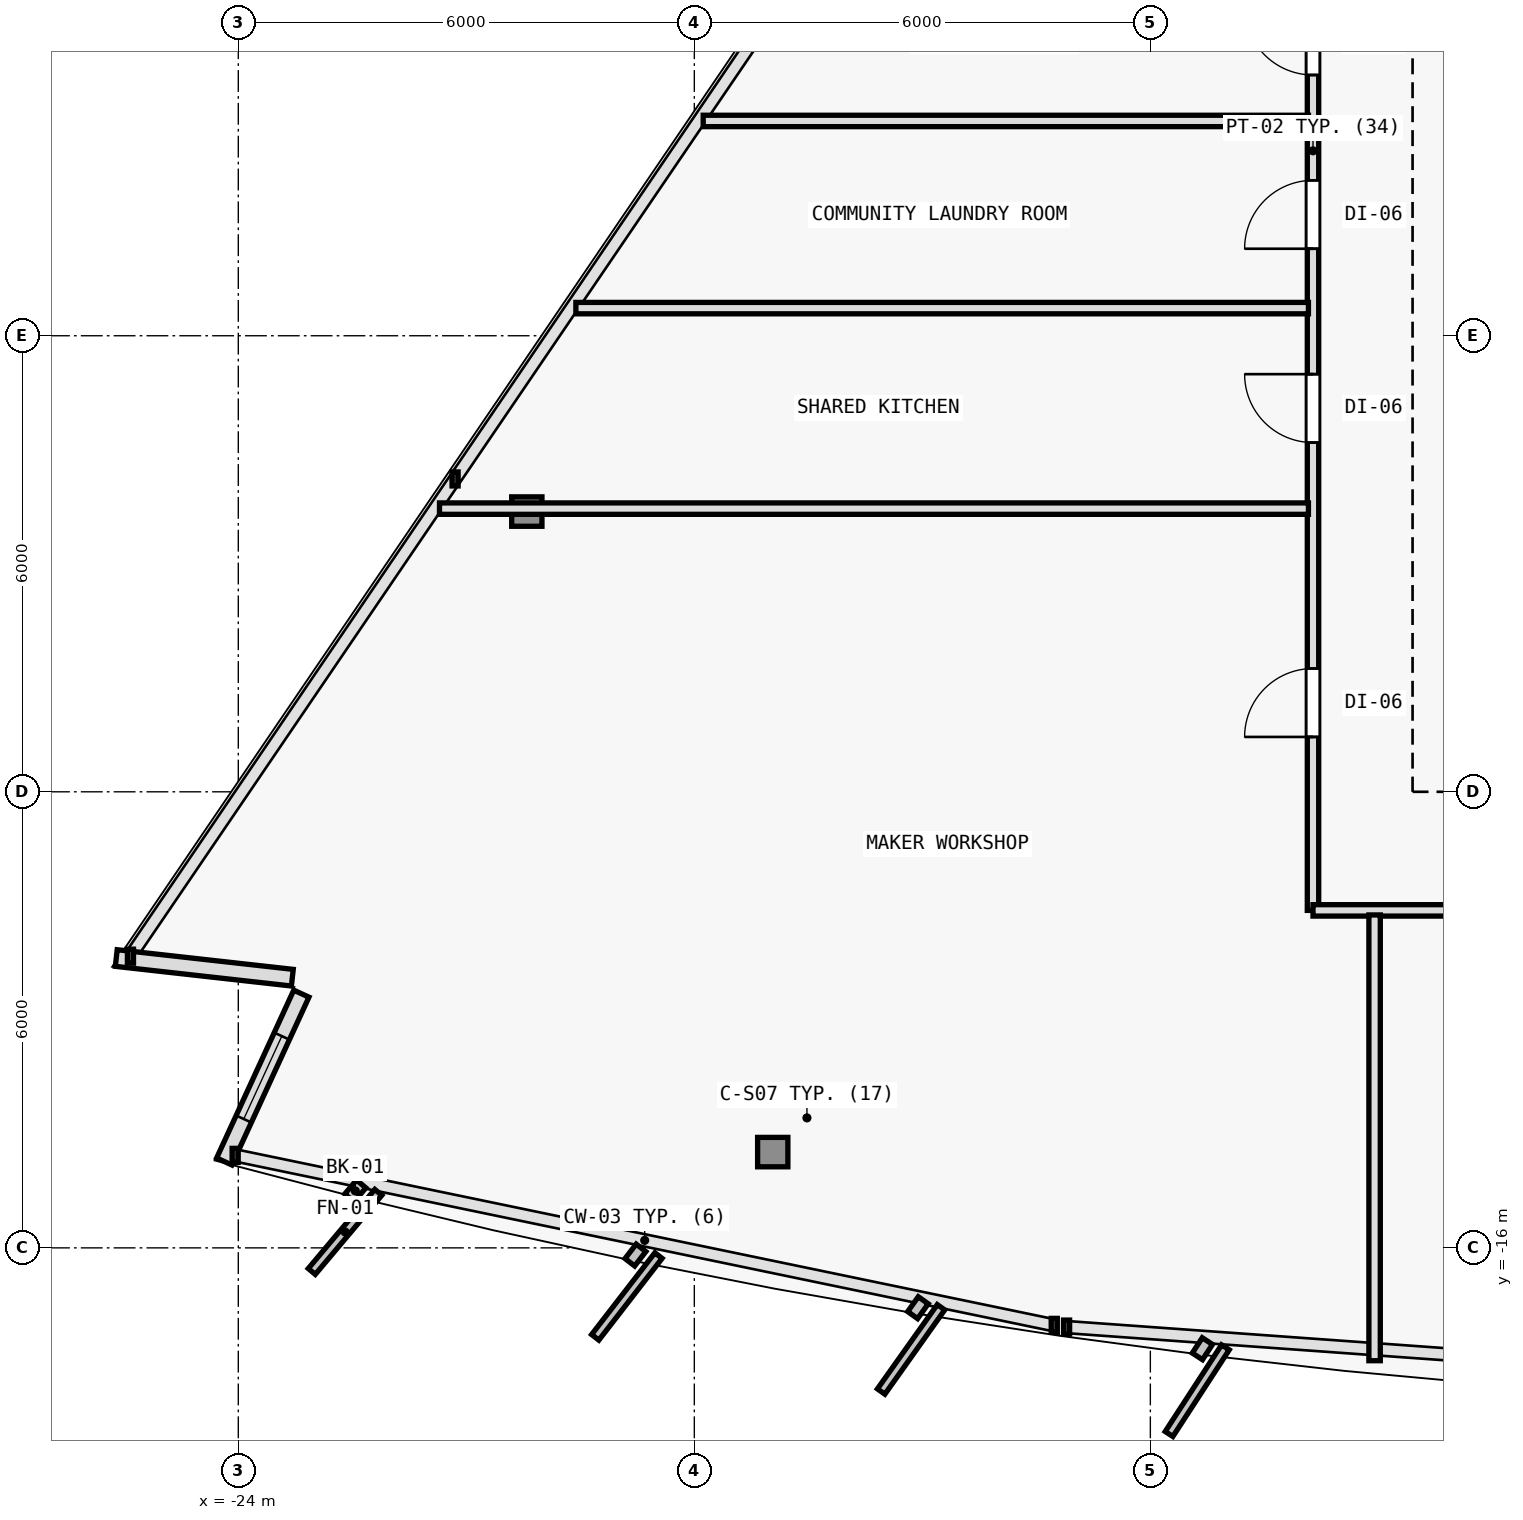
"""IFC4 building model, lengths in metres.
Left out: names, types, materials, properties, quantities, classifications, styles, units other than length and angle.
Written with IfcOpenShell. Run it as: python <this file> out.ifc"""

import sys

from ifc_helpers import new_model, si_unit, direction, frame, frame_2d, origin, origin_2d, place, context, subcontext, project, spatial, rectangle, i_section, extrude, element, fill, save


model = new_model("IFC4")
c1 = context("Model", 3, precision=1e-05, world=origin(), true_north=direction((0.0, 1.0)))
c2 = subcontext(c1, "Body", "Model", "MODEL_VIEW")
j1 = project(units=[si_unit("LENGTHUNIT", "METRE"), si_unit("PLANEANGLEUNIT", "RADIAN")], contexts=[c1])
p1 = place(None, origin())
s1 = spatial("IfcSite", under=j1, at=p1, CompositionType="ELEMENT")
p2 = place(p1, origin())
s2 = spatial("IfcBuilding", under=s1, at=p2, CompositionType="ELEMENT")
p3 = place(p2, frame((0.0, 0.0, 198.3)))
s3 = spatial("IfcBuildingStorey", under=s2, at=p3, CompositionType="ELEMENT", Elevation=198.3)
p4 = place(p3, frame((-16.968, -14.74, 0.005), z_axis=(0.020594893987, 0.033509183946, 0.999226193078), x_axis=(-0.851954850327, 0.523615252838, 0.0)))
e1 = element("IfcColumn", 1, at=p4, inside=s3, PredefinedType="COLUMN", context=c2, shape_type="SweptSolid", body=[
    extrude(i_section(OverallWidth=0.398, OverallDepth=0.387, WebThickness=0.013, FlangeThickness=0.022, FilletRadius=0.015, at=origin_2d()), origin(), (0.0, 0.0, 1.0), 3.592),
])
p5 = place(p3, frame((-20.204, -6.313, 0.005), z_axis=(0.025222449659, 0.021619242565, 0.999448065876), x_axis=(-0.650791373456, 0.759256602365, 0.0)))
e2 = element("IfcColumn", 2, at=p5, inside=s3, PredefinedType="COLUMN", context=c2, shape_type="SweptSolid", body=[
    extrude(i_section(OverallWidth=0.398, OverallDepth=0.387, WebThickness=0.013, FlangeThickness=0.022, FilletRadius=0.015, at=origin_2d()), origin(), (0.0, 0.0, 1.0), 3.591),
])
p6 = place(p3, frame((-23.289, -12.446, 0.0), z_axis=(0.0, 0.0, 1.0), x_axis=(-0.993829972675, 0.110914315635, 0.0)))
e3 = element("IfcWall", 3, at=p6, inside=s3, PredefinedType="SOLIDWALL", context=c2, shape_type="SweptSolid", body=[
    extrude(rectangle(XDim=2.331, YDim=0.22, at=frame_2d((1.166, 0.0))), origin(), (0.0, 0.0, 1.0), 3.35),
])
p7 = place(p3, frame((-24.185, -14.863, 0.0), z_axis=(0.0, 0.0, 1.0), x_axis=(0.417509141111, 0.90867272276, 0.0)))
e4 = element("IfcWall", 4, at=p7, inside=s3, PredefinedType="SOLIDWALL", context=c2, shape_type="SweptSolid", body=[
    extrude(rectangle(XDim=2.43, YDim=0.22, at=frame_2d((1.215, 0.0))), origin(), (0.0, 0.0, 1.0), 3.35),
])
p8 = place(p7, frame((0.615, 0.0, 0.62)))
e5 = element("IfcOpeningElement", 5, at=p8, cuts=e4, PredefinedType="OPENING", context=c2, shape_type="SweptSolid", body=[
    extrude(rectangle(XDim=1.2, YDim=1.8, at=frame_2d((0.6, 0.9))), frame((0.0, 0.12, 0.0), z_axis=(0.0, -1.0, 0.0), x_axis=(1.0, 0.0, 0.0)), (0.0, 0.0, 1.0), 0.24),
])
p9 = place(p3, frame((-9.86, -11.56, 0.0), z_axis=(0.0, 0.0, 1.0), x_axis=(0.0, 1.0, 0.0)))
e6 = element("IfcWall", 6, at=p9, inside=s3, PredefinedType="PARTITIONING", context=c2, shape_type="SweptSolid", body=[
    extrude(rectangle(XDim=19.986, YDim=0.15, at=frame_2d((9.993, 0.0))), origin(), (0.0, 0.0, 1.0), 2.725),
])
p10 = place(p9, frame((10.99, 0.0, 0.0)))
e7 = element("IfcOpeningElement", 7, at=p10, cuts=e6, PredefinedType="OPENING", context=c2, shape_type="SweptSolid", body=[
    extrude(rectangle(XDim=0.9, YDim=2.1, at=frame_2d((0.45, 1.05))), frame((0.0, 0.085, 0.0), z_axis=(0.0, -1.0, 0.0), x_axis=(1.0, 0.0, 0.0)), (0.0, 0.0, 1.0), 0.17),
])
p11 = place(p9, frame((8.705, 0.0, 0.0)))
e8 = element("IfcOpeningElement", 8, at=p11, cuts=e6, PredefinedType="OPENING", context=c2, shape_type="SweptSolid", body=[
    extrude(rectangle(XDim=0.9, YDim=2.1, at=frame_2d((0.45, 1.05))), frame((0.0, 0.085, 0.0), z_axis=(0.0, -1.0, 0.0), x_axis=(1.0, 0.0, 0.0)), (0.0, 0.0, 1.0), 0.17),
])
p12 = place(p9, frame((6.155, 0.0, 0.0)))
e9 = element("IfcOpeningElement", 9, at=p12, cuts=e6, PredefinedType="OPENING", context=c2, shape_type="SweptSolid", body=[
    extrude(rectangle(XDim=0.9, YDim=2.1, at=frame_2d((0.45, 1.05))), frame((0.0, 0.085, 0.0), z_axis=(0.0, -1.0, 0.0), x_axis=(1.0, 0.0, 0.0)), (0.0, 0.0, 1.0), 0.17),
])
p13 = place(p9, frame((2.282, 0.0, 0.0)))
e10 = element("IfcOpeningElement", 10, at=p13, cuts=e6, PredefinedType="OPENING", context=c2, shape_type="SweptSolid", body=[
    extrude(rectangle(XDim=0.9, YDim=2.1, at=frame_2d((0.45, 1.05))), frame((0.0, 0.085, 0.0), z_axis=(0.0, -1.0, 0.0), x_axis=(1.0, 0.0, 0.0)), (0.0, 0.0, 1.0), 0.17),
])
p14 = place(p9, frame((17.109, 0.0, 0.0)))
e11 = element("IfcOpeningElement", 11, at=p14, cuts=e6, PredefinedType="OPENING", context=c2, shape_type="SweptSolid", body=[
    extrude(rectangle(XDim=0.9, YDim=2.1, at=frame_2d((0.45, 1.05))), frame((0.0, 0.085, 0.0), z_axis=(0.0, -1.0, 0.0), x_axis=(1.0, 0.0, 0.0)), (0.0, 0.0, 1.0), 0.17),
])
p15 = place(p9, frame((13.453, 0.0, 0.0)))
e12 = element("IfcOpeningElement", 12, at=p15, cuts=e6, PredefinedType="OPENING", context=c2, shape_type="SweptSolid", body=[
    extrude(rectangle(XDim=0.9, YDim=2.1, at=frame_2d((0.45, 1.05))), frame((0.0, 0.085, 0.0), z_axis=(0.0, -1.0, 0.0), x_axis=(1.0, 0.0, 0.0)), (0.0, 0.0, 1.0), 0.17),
])
p16 = place(p3, frame((13.18, -11.56, 0.0), z_axis=(0.0, 0.0, 1.0), x_axis=(-1.0, 0.0, 0.0)))
e13 = element("IfcWall", 13, at=p16, inside=s3, PredefinedType="PARTITIONING", context=c2, shape_type="SweptSolid", body=[
    extrude(rectangle(XDim=23.04, YDim=0.15, at=frame_2d((11.52, 0.0))), origin(), (0.0, 0.0, 1.0), 2.725),
])
p17 = place(p16, frame((14.417, 0.0, 0.0)))
e14 = element("IfcOpeningElement", 14, at=p17, cuts=e13, PredefinedType="OPENING", context=c2, shape_type="SweptSolid", body=[
    extrude(rectangle(XDim=0.9, YDim=2.1, at=frame_2d((0.45, 1.05))), frame((0.0, 0.085, 0.0), z_axis=(0.0, -1.0, 0.0), x_axis=(1.0, 0.0, 0.0)), (0.0, 0.0, 1.0), 0.17),
])
p18 = place(p16, frame((5.922, 0.0, 0.0)))
e15 = element("IfcOpeningElement", 15, at=p18, cuts=e13, PredefinedType="OPENING", context=c2, shape_type="SweptSolid", body=[
    extrude(rectangle(XDim=0.9, YDim=2.1, at=frame_2d((0.45, 1.05))), frame((0.0, 0.085, 0.0), z_axis=(0.0, -1.0, 0.0), x_axis=(1.0, 0.0, 0.0)), (0.0, 0.0, 1.0), 0.17),
])
p19 = place(p16, frame((3.459, 0.0, 0.0)))
e16 = element("IfcOpeningElement", 16, at=p19, cuts=e13, PredefinedType="OPENING", context=c2, shape_type="SweptSolid", body=[
    extrude(rectangle(XDim=0.9, YDim=2.1, at=frame_2d((0.45, 1.05))), frame((0.0, 0.085, 0.0), z_axis=(0.0, -1.0, 0.0), x_axis=(1.0, 0.0, 0.0)), (0.0, 0.0, 1.0), 0.17),
])
p20 = place(p16, frame((0.929, 0.0, 0.0)))
e17 = element("IfcOpeningElement", 17, at=p20, cuts=e13, PredefinedType="OPENING", context=c2, shape_type="SweptSolid", body=[
    extrude(rectangle(XDim=0.9, YDim=2.1, at=frame_2d((0.45, 1.05))), frame((0.0, 0.085, 0.0), z_axis=(0.0, -1.0, 0.0), x_axis=(1.0, 0.0, 0.0)), (0.0, 0.0, 1.0), 0.17),
])
p21 = place(p3, frame((-9.92, -6.274, 0.0), z_axis=(0.0, 0.0, 1.0), x_axis=(-1.0, 0.0, 0.0)))
e18 = element("IfcWall", 18, at=p21, inside=s3, PredefinedType="PARTITIONING", context=c2, shape_type="SweptSolid", body=[
    extrude(rectangle(XDim=11.433, YDim=0.15, at=frame_2d((5.716, 0.0))), origin(), (0.0, 0.0, 1.0), 2.725),
])
p22 = place(p3, frame((-9.92, -1.174, 0.0), z_axis=(0.0, 0.0, 1.0), x_axis=(-1.0, 0.0, 0.0)))
e19 = element("IfcWall", 19, at=p22, inside=s3, PredefinedType="PARTITIONING", context=c2, shape_type="SweptSolid", body=[
    extrude(rectangle(XDim=7.963, YDim=0.15, at=frame_2d((3.982, 0.0))), origin(), (0.0, 0.0, 1.0), 2.725),
])
p23 = place(p3, frame((-9.92, -3.636, 0.0), z_axis=(0.0, 0.0, 1.0), x_axis=(-1.0, 0.0, 0.0)))
e20 = element("IfcWall", 20, at=p23, inside=s3, PredefinedType="PARTITIONING", context=c2, shape_type="SweptSolid", body=[
    extrude(rectangle(XDim=9.638, YDim=0.15, at=frame_2d((4.819, 0.0))), origin(), (0.0, 0.0, 1.0), 2.725),
])
p24 = place(p3, frame((-9.05, -11.62, 0.0), z_axis=(0.0, 0.0, 1.0), x_axis=(0.0, -1.0, 0.0)))
e21 = element("IfcWall", 21, at=p24, inside=s3, PredefinedType="PARTITIONING", context=c2, shape_type="SweptSolid", body=[
    extrude(rectangle(XDim=5.865, YDim=0.15, at=frame_2d((2.932, 0.0))), origin(), (0.0, 0.0, 1.0), 2.935),
])
p25 = place(p8, origin())
e22 = element("IfcWindow", 22, at=p25, inside=s3, PartitioningType="SINGLE_PANEL", PredefinedType="WINDOW", context=c2, shape_type="SweptSolid", body=[
    extrude(rectangle(XDim=1.2, YDim=1.8, at=frame_2d((0.6, 0.9))), frame((0.0, 0.03, 0.0), z_axis=(0.0, -1.0, 0.0), x_axis=(1.0, 0.0, 0.0)), (0.0, 0.0, 1.0), 0.06),
])
fill(e5, e22)
p26 = place(p10, origin())
e23 = element("IfcDoor", 23, at=p26, inside=s3, OperationType="SINGLE_SWING_RIGHT", PredefinedType="DOOR", context=c2, shape_type="SweptSolid", body=[
    extrude(rectangle(XDim=0.9, YDim=2.1, at=frame_2d((0.45, 1.05))), frame((0.0, 0.025, 0.0), z_axis=(0.0, -1.0, 0.0), x_axis=(1.0, 0.0, 0.0)), (0.0, 0.0, 1.0), 0.05),
])
fill(e7, e23)
p27 = place(p11, origin())
e24 = element("IfcDoor", 24, at=p27, inside=s3, OperationType="SINGLE_SWING_LEFT", PredefinedType="DOOR", context=c2, shape_type="SweptSolid", body=[
    extrude(rectangle(XDim=0.9, YDim=2.1, at=frame_2d((0.45, 1.05))), frame((0.0, 0.025, 0.0), z_axis=(0.0, -1.0, 0.0), x_axis=(1.0, 0.0, 0.0)), (0.0, 0.0, 1.0), 0.05),
])
fill(e8, e24)
p28 = place(p12, origin())
e25 = element("IfcDoor", 25, at=p28, inside=s3, OperationType="SINGLE_SWING_RIGHT", PredefinedType="DOOR", context=c2, shape_type="SweptSolid", body=[
    extrude(rectangle(XDim=0.9, YDim=2.1, at=frame_2d((0.45, 1.05))), frame((0.0, 0.025, 0.0), z_axis=(0.0, -1.0, 0.0), x_axis=(1.0, 0.0, 0.0)), (0.0, 0.0, 1.0), 0.05),
])
fill(e9, e25)
p29 = place(p13, origin())
e26 = element("IfcDoor", 26, at=p29, inside=s3, OperationType="SINGLE_SWING_LEFT", PredefinedType="DOOR", context=c2, shape_type="SweptSolid", body=[
    extrude(rectangle(XDim=0.9, YDim=2.1, at=frame_2d((0.45, 1.05))), frame((0.0, 0.025, 0.0), z_axis=(0.0, -1.0, 0.0), x_axis=(1.0, 0.0, 0.0)), (0.0, 0.0, 1.0), 0.05),
])
fill(e10, e26)
save(model, sys.argv[1])
